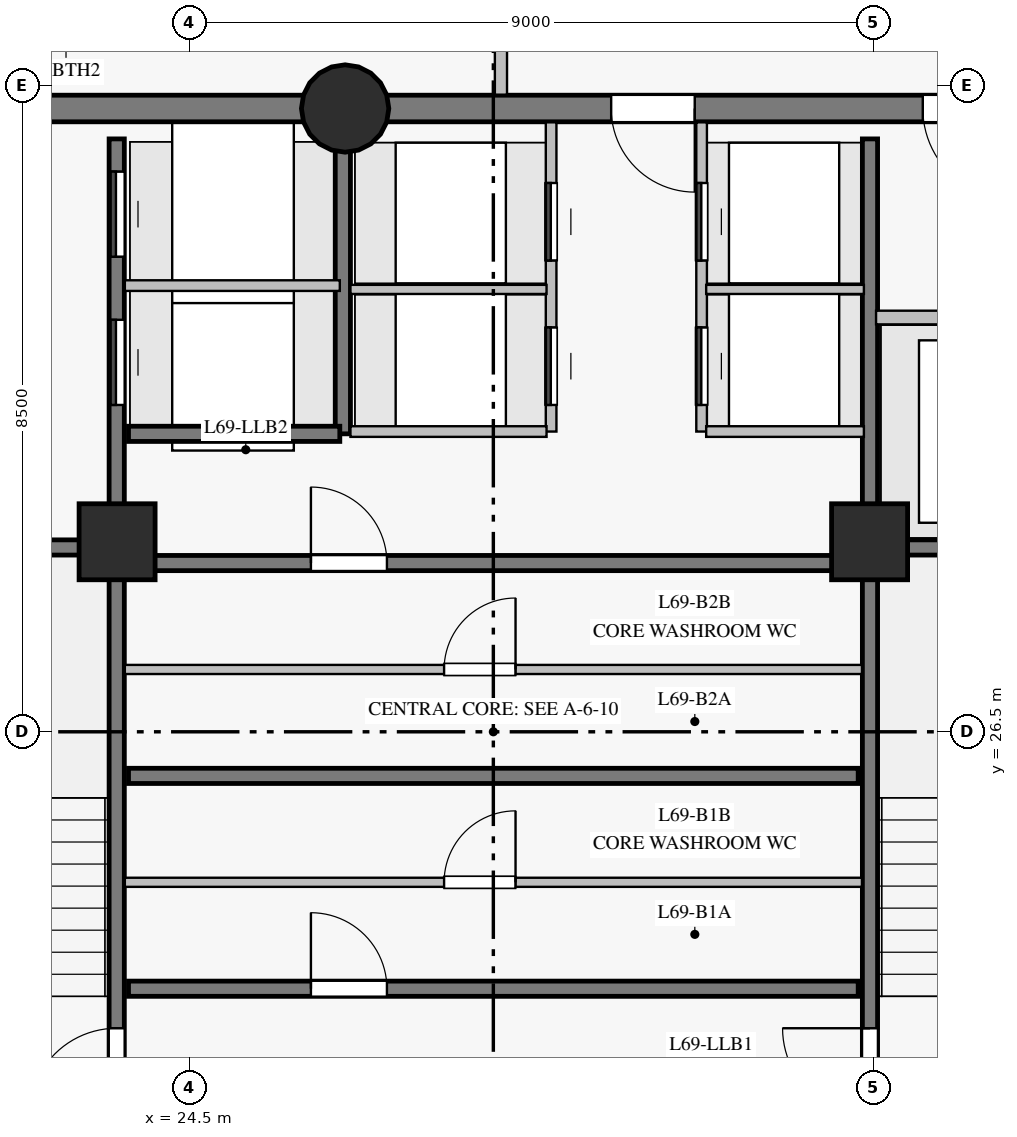
"""IFC4 building model, lengths in metres.
Left out: names, types, materials, properties, quantities, classifications, styles, units other than length and angle.
Written with IfcOpenShell. Run it as: python <this file> out.ifc"""

import sys

from ifc_helpers import new_model, si_unit, direction, frame, frame_2d, origin, origin_with_axes, origin_2d, place, context, subcontext, project, spatial, rectangle, circle, extrude, source, transform, mapped, element, fill, save


model = new_model("IFC4")
c1 = context("Model", 3, precision=1e-05, world=origin(), true_north=direction((0.0, 1.0)))
c2 = subcontext(c1, "Body", "Model", "MODEL_VIEW")
j1 = project(units=[si_unit("LENGTHUNIT", "METRE"), si_unit("PLANEANGLEUNIT", "RADIAN")], contexts=[c1])
p1 = place(None, origin())
s1 = spatial("IfcSite", under=j1, at=p1, CompositionType="ELEMENT")
p2 = place(p1, origin())
s2 = spatial("IfcBuilding", under=s1, at=p2, CompositionType="ELEMENT")
p3 = place(p2, frame((0.0, 0.0, 235.2)))
s3 = spatial("IfcBuildingStorey", under=s2, at=p3, CompositionType="ELEMENT", Elevation=235.2)
p4 = place(p3, frame((37.5, 34.7, 0.0), z_axis=(0.0, 0.0, 1.0), x_axis=(-1.0, 0.0, 0.0)))
e1 = element("IfcWall", 1, at=p4, inside=s3, PredefinedType="SHEAR", context=c2, shape_type="SweptSolid", body=[
    extrude(rectangle(XDim=10.95, YDim=0.35, at=frame_2d((5.475, 0.0))), origin(), (0.0, 0.0, 1.0), 2.85),
])
p5 = place(p4, frame((2.15, 0.0, 0.0)))
e2 = element("IfcOpeningElement", 2, at=p5, cuts=e1, PredefinedType="OPENING", context=c2, shape_type="SweptSolid", body=[
    extrude(rectangle(XDim=1.2, YDim=2.15, at=frame_2d((0.6, 1.075))), frame((0.0, 0.185, 0.0), z_axis=(0.0, -1.0, 0.0), x_axis=(1.0, 0.0, 0.0)), (0.0, 0.0, 1.0), 0.37),
])
p6 = place(p4, frame((6.35, 0.0, 0.0)))
e3 = element("IfcOpeningElement", 3, at=p6, cuts=e1, PredefinedType="OPENING", context=c2, shape_type="SweptSolid", body=[
    extrude(rectangle(XDim=1.1, YDim=2.15, at=frame_2d((0.55, 1.075))), frame((0.0, 0.185, 0.0), z_axis=(0.0, -1.0, 0.0), x_axis=(1.0, 0.0, 0.0)), (0.0, 0.0, 1.0), 0.37),
])
p7 = place(p3, frame((26.55, 34.7, 0.0), z_axis=(0.0, 0.0, 1.0), x_axis=(-1.0, 0.0, 0.0)))
e4 = element("IfcWall", 4, at=p7, inside=s3, PredefinedType="SHEAR", context=c2, shape_type="SweptSolid", body=[
    extrude(rectangle(XDim=7.05, YDim=0.35, at=frame_2d((3.525, 0.0))), origin(), (0.0, 0.0, 1.0), 2.85),
])
m1 = source(origin_with_axes(), c2, "Body", "SweptSolid", [
    extrude(circle(Radius=0.575, at=origin_2d()), origin(), (0.0, 0.0, 1.0), 3.05),
])
p8 = place(p3, frame((26.55, 34.7, 0.0), z_axis=(0.0, 0.0, 1.0), x_axis=(1.0, 0.0, 0.0)))
e5 = element("IfcColumn", 5, at=p8, inside=s3, PredefinedType="COLUMN", context=c2, shape_type="MappedRepresentation", body=[
    mapped(m1, transform((0.0, 0.0, 0.0), scale=1.0)),
])
m2 = source(origin_with_axes(), c2, "Body", "SweptSolid", [
    extrude(rectangle(XDim=1.0, YDim=1.0, at=origin_2d()), origin(), (0.0, 0.0, 1.0), 3.05),
])
for number, where, z_axis, x_axis in (
    (6, (23.55, 29.0, 0.0), (0.0, 0.0, 1.0), (1.0, 0.0, 0.0)),
    (7, (33.45, 29.0, 0.0), (0.0, 0.0, 1.0), (1.0, 0.0, 0.0)),
):
    element("IfcColumn", number, at=place(p3, frame(where, z_axis=z_axis, x_axis=x_axis)), inside=s3, PredefinedType="COLUMN", context=c2, shape_type="MappedRepresentation", body=[
        mapped(m2, transform((0.0, 0.0, 0.0), scale=1.0)),
    ])
p9 = place(p3, frame((23.545, 18.7, 0.0), z_axis=(0.0, 0.0, 1.0), x_axis=(0.0, 1.0, 0.0)))
e8 = element("IfcWall", 8, at=p9, inside=s3, PredefinedType="SHEAR", context=c2, shape_type="SweptSolid", body=[
    extrude(rectangle(XDim=15.6, YDim=0.2, at=frame_2d((7.8, 0.0))), origin(), (0.0, 0.0, 1.0), 2.85),
])
p10 = place(p9, frame((2.75, 0.0, 0.0)))
e9 = element("IfcOpeningElement", 9, at=p10, cuts=e8, PredefinedType="OPENING", context=c2, shape_type="SweptSolid", body=[
    extrude(rectangle(XDim=1.15, YDim=2.15, at=frame_2d((0.575, 1.075))), frame((0.0, 0.11, 0.0), z_axis=(0.0, -1.0, 0.0), x_axis=(1.0, 0.0, 0.0)), (0.0, 0.0, 1.0), 0.22),
])
p11 = place(p9, frame((0.14, 0.0, 0.0)))
e10 = element("IfcOpeningElement", 10, at=p11, cuts=e8, PredefinedType="OPENING", context=c2, shape_type="SweptSolid", body=[
    extrude(rectangle(XDim=0.88, YDim=2.1, at=frame_2d((0.44, 1.05))), frame((0.0, 0.11, 0.0), z_axis=(0.0, -1.0, 0.0), x_axis=(1.0, 0.0, 0.0)), (0.0, 0.0, 1.0), 0.22),
])
p12 = place(p9, frame((1.36, 0.0, 0.0)))
e11 = element("IfcOpeningElement", 11, at=p12, cuts=e8, PredefinedType="OPENING", context=c2, shape_type="SweptSolid", body=[
    extrude(rectangle(XDim=0.88, YDim=2.1, at=frame_2d((0.44, 1.05))), frame((0.0, 0.11, 0.0), z_axis=(0.0, -1.0, 0.0), x_axis=(1.0, 0.0, 0.0)), (0.0, 0.0, 1.0), 0.22),
])
p13 = place(p9, frame((12.1, 0.0, 0.0)))
e12 = element("IfcOpeningElement", 12, at=p13, cuts=e8, PredefinedType="OPENING", context=c2, shape_type="SweptSolid", body=[
    extrude(rectangle(XDim=1.12, YDim=2.15, at=frame_2d((0.56, 1.075))), frame((0.0, 0.11, 0.0), z_axis=(0.0, -1.0, 0.0), x_axis=(1.0, 0.0, 0.0)), (0.0, 0.0, 1.0), 0.22),
])
p14 = place(p9, frame((14.05, 0.0, 0.0)))
e13 = element("IfcOpeningElement", 13, at=p14, cuts=e8, PredefinedType="OPENING", context=c2, shape_type="SweptSolid", body=[
    extrude(rectangle(XDim=1.12, YDim=2.15, at=frame_2d((0.56, 1.075))), frame((0.0, 0.11, 0.0), z_axis=(0.0, -1.0, 0.0), x_axis=(1.0, 0.0, 0.0)), (0.0, 0.0, 1.0), 0.22),
])
p15 = place(p3, frame((33.455, 18.7, 0.0), z_axis=(0.0, 0.0, 1.0), x_axis=(0.0, 1.0, 0.0)))
e14 = element("IfcWall", 14, at=p15, inside=s3, PredefinedType="SHEAR", context=c2, shape_type="SweptSolid", body=[
    extrude(rectangle(XDim=15.6, YDim=0.2, at=frame_2d((7.8, 0.0))), origin(), (0.0, 0.0, 1.0), 2.85),
])
p16 = place(p15, frame((2.75, 0.0, 0.0)))
e15 = element("IfcOpeningElement", 15, at=p16, cuts=e14, PredefinedType="OPENING", context=c2, shape_type="SweptSolid", body=[
    extrude(rectangle(XDim=1.15, YDim=2.15, at=frame_2d((0.575, 1.075))), frame((0.0, 0.11, 0.0), z_axis=(0.0, -1.0, 0.0), x_axis=(1.0, 0.0, 0.0)), (0.0, 0.0, 1.0), 0.22),
])
p17 = place(p15, frame((0.55, 0.0, 0.0)))
e16 = element("IfcOpeningElement", 16, at=p17, cuts=e14, PredefinedType="OPENING", context=c2, shape_type="SweptSolid", body=[
    extrude(rectangle(XDim=0.94, YDim=2.1, at=frame_2d((0.47, 1.05))), frame((0.0, 0.11, 0.0), z_axis=(0.0, -1.0, 0.0), x_axis=(1.0, 0.0, 0.0)), (0.0, 0.0, 1.0), 0.22),
])
p18 = place(p3, frame((23.7, 23.12, 0.0), z_axis=(0.0, 0.0, 1.0), x_axis=(1.0, 0.0, 0.0)))
e17 = element("IfcWall", 17, at=p18, inside=s3, PredefinedType="SHEAR", context=c2, shape_type="SweptSolid", body=[
    extrude(rectangle(XDim=9.6, YDim=0.2, at=frame_2d((4.8, 0.0))), origin(), (0.0, 0.0, 1.0), 2.85),
])
p19 = place(p18, frame((2.4, 0.0, 0.0)))
e18 = element("IfcOpeningElement", 18, at=p19, cuts=e17, PredefinedType="OPENING", context=c2, shape_type="SweptSolid", body=[
    extrude(rectangle(XDim=1.0, YDim=2.15, at=frame_2d((0.5, 1.075))), frame((0.0, 0.11, 0.0), z_axis=(0.0, -1.0, 0.0), x_axis=(1.0, 0.0, 0.0)), (0.0, 0.0, 1.0), 0.22),
])
p20 = place(p3, frame((23.7, 25.92, 0.0), z_axis=(0.0, 0.0, 1.0), x_axis=(1.0, 0.0, 0.0)))
e19 = element("IfcWall", 19, at=p20, inside=s3, PredefinedType="SHEAR", context=c2, shape_type="SweptSolid", body=[
    extrude(rectangle(XDim=9.6, YDim=0.2, at=frame_2d((4.8, 0.0))), origin(), (0.0, 0.0, 1.0), 2.85),
])
p21 = place(p3, frame((23.7, 28.72, 0.0), z_axis=(0.0, 0.0, 1.0), x_axis=(1.0, 0.0, 0.0)))
e20 = element("IfcWall", 20, at=p21, inside=s3, PredefinedType="SHEAR", context=c2, shape_type="SweptSolid", body=[
    extrude(rectangle(XDim=9.6, YDim=0.2, at=frame_2d((4.8, 0.0))), origin(), (0.0, 0.0, 1.0), 2.85),
])
p22 = place(p21, frame((2.4, 0.0, 0.0)))
e21 = element("IfcOpeningElement", 21, at=p22, cuts=e20, PredefinedType="OPENING", context=c2, shape_type="SweptSolid", body=[
    extrude(rectangle(XDim=1.0, YDim=2.15, at=frame_2d((0.5, 1.075))), frame((0.0, 0.11, 0.0), z_axis=(0.0, -1.0, 0.0), x_axis=(1.0, 0.0, 0.0)), (0.0, 0.0, 1.0), 0.22),
])
for number, where, z_axis, x_axis in (
    (22, (33.455, 28.925, 0.0), (0.0, 0.0, 1.0), (1.0, 0.0, 0.0)),
    (23, (19.55, 28.925, 0.0), (0.0, 0.0, 1.0), (1.0, 0.0, 0.0)),
):
    element("IfcWall", number, at=place(p3, frame(where, z_axis=z_axis, x_axis=x_axis)), inside=s3, PredefinedType="SHEAR", context=c2, shape_type="SweptSolid", body=[
        extrude(rectangle(XDim=3.995, YDim=0.2, at=frame_2d((1.998, 0.0))), origin(), (0.0, 0.0, 1.0), 2.85),
    ])
p23 = place(p3, frame((26.52, 30.42, 0.0), z_axis=(0.0, 0.0, 1.0), x_axis=(0.0, 1.0, 0.0)))
e24 = element("IfcWall", 24, at=p23, inside=s3, PredefinedType="SHEAR", context=c2, shape_type="SweptSolid", body=[
    extrude(rectangle(XDim=3.86, YDim=0.2, at=frame_2d((1.93, 0.0))), origin(), (0.0, 0.0, 1.0), 2.85),
])
p24 = place(p3, frame((23.7, 30.42, 0.0), z_axis=(0.0, 0.0, 1.0), x_axis=(1.0, 0.0, 0.0)))
e25 = element("IfcWall", 25, at=p24, inside=s3, PredefinedType="SHEAR", context=c2, shape_type="SweptSolid", body=[
    extrude(rectangle(XDim=2.78, YDim=0.2, at=frame_2d((1.39, 0.0))), origin(), (0.0, 0.0, 1.0), 2.85),
])
p25 = place(p3, frame((23.652, 24.52, 0.0), z_axis=(0.0, 0.0, 1.0), x_axis=(1.0, 0.0, 0.0)))
e26 = element("IfcWall", 26, at=p25, inside=s3, PredefinedType="PARTITIONING", context=c2, shape_type="SweptSolid", body=[
    extrude(rectangle(XDim=9.698, YDim=0.12, at=frame_2d((4.849, 0.0))), origin(), (0.0, 0.0, 1.0), 2.85),
])
p26 = place(p25, frame((4.2, 0.0, 0.0)))
e27 = element("IfcOpeningElement", 27, at=p26, cuts=e26, PredefinedType="OPENING", context=c2, shape_type="SweptSolid", body=[
    extrude(rectangle(XDim=0.94, YDim=2.1, at=frame_2d((0.47, 1.05))), frame((0.0, 0.07, 0.0), z_axis=(0.0, -1.0, 0.0), x_axis=(1.0, 0.0, 0.0)), (0.0, 0.0, 1.0), 0.14),
])
p27 = place(p3, frame((23.652, 27.32, 0.0), z_axis=(0.0, 0.0, 1.0), x_axis=(1.0, 0.0, 0.0)))
e28 = element("IfcWall", 28, at=p27, inside=s3, PredefinedType="PARTITIONING", context=c2, shape_type="SweptSolid", body=[
    extrude(rectangle(XDim=9.698, YDim=0.12, at=frame_2d((4.849, 0.0))), origin(), (0.0, 0.0, 1.0), 2.85),
])
p28 = place(p27, frame((4.2, 0.0, 0.0)))
e29 = element("IfcOpeningElement", 29, at=p28, cuts=e28, PredefinedType="OPENING", context=c2, shape_type="SweptSolid", body=[
    extrude(rectangle(XDim=0.94, YDim=2.1, at=frame_2d((0.47, 1.05))), frame((0.0, 0.07, 0.0), z_axis=(0.0, -1.0, 0.0), x_axis=(1.0, 0.0, 0.0)), (0.0, 0.0, 1.0), 0.14),
])
p29 = place(p3, frame((29.26, 30.45, 0.0), z_axis=(0.0, 0.0, 1.0), x_axis=(0.0, 1.0, 0.0)))
e30 = element("IfcWall", 30, at=p29, inside=s3, PredefinedType="PARTITIONING", context=c2, shape_type="SweptSolid", body=[
    extrude(rectangle(XDim=4.068, YDim=0.14, at=frame_2d((2.034, 0.0))), origin(), (0.0, 0.0, 1.0), 2.85),
])
p30 = place(p29, frame((0.35, 0.0, 0.0)))
e31 = element("IfcOpeningElement", 31, at=p30, cuts=e30, PredefinedType="OPENING", context=c2, shape_type="SweptSolid", body=[
    extrude(rectangle(XDim=1.02, YDim=2.15, at=frame_2d((0.51, 1.075))), frame((0.0, 0.08, 0.0), z_axis=(0.0, -1.0, 0.0), x_axis=(1.0, 0.0, 0.0)), (0.0, 0.0, 1.0), 0.16),
])
p31 = place(p29, frame((2.25, 0.0, 0.0)))
e32 = element("IfcOpeningElement", 32, at=p31, cuts=e30, PredefinedType="OPENING", context=c2, shape_type="SweptSolid", body=[
    extrude(rectangle(XDim=1.02, YDim=2.15, at=frame_2d((0.51, 1.075))), frame((0.0, 0.08, 0.0), z_axis=(0.0, -1.0, 0.0), x_axis=(1.0, 0.0, 0.0)), (0.0, 0.0, 1.0), 0.16),
])
p32 = place(p3, frame((31.24, 30.45, 0.0), z_axis=(0.0, 0.0, 1.0), x_axis=(0.0, 1.0, 0.0)))
e33 = element("IfcWall", 33, at=p32, inside=s3, PredefinedType="PARTITIONING", context=c2, shape_type="SweptSolid", body=[
    extrude(rectangle(XDim=4.068, YDim=0.14, at=frame_2d((2.034, 0.0))), origin(), (0.0, 0.0, 1.0), 2.85),
])
p33 = place(p32, frame((0.35, 0.0, 0.0)))
e34 = element("IfcOpeningElement", 34, at=p33, cuts=e33, PredefinedType="OPENING", context=c2, shape_type="SweptSolid", body=[
    extrude(rectangle(XDim=1.02, YDim=2.15, at=frame_2d((0.51, 1.075))), frame((0.0, 0.08, 0.0), z_axis=(0.0, -1.0, 0.0), x_axis=(1.0, 0.0, 0.0)), (0.0, 0.0, 1.0), 0.16),
])
p34 = place(p32, frame((2.25, 0.0, 0.0)))
e35 = element("IfcOpeningElement", 35, at=p34, cuts=e33, PredefinedType="OPENING", context=c2, shape_type="SweptSolid", body=[
    extrude(rectangle(XDim=1.02, YDim=2.15, at=frame_2d((0.51, 1.075))), frame((0.0, 0.08, 0.0), z_axis=(0.0, -1.0, 0.0), x_axis=(1.0, 0.0, 0.0)), (0.0, 0.0, 1.0), 0.16),
])
p35 = place(p3, frame((33.535, 31.95, 0.0), z_axis=(0.0, 0.0, 1.0), x_axis=(1.0, 0.0, 0.0)))
e36 = element("IfcWall", 36, at=p35, inside=s3, PredefinedType="PARTITIONING", context=c2, shape_type="SweptSolid", body=[
    extrude(rectangle(XDim=3.784, YDim=0.18, at=frame_2d((1.892, 0.0))), origin(), (0.0, 0.0, 1.0), 2.85),
])
p36 = place(p35, frame((0.9, 0.0, 0.0)))
e37 = element("IfcOpeningElement", 37, at=p36, cuts=e36, PredefinedType="OPENING", context=c2, shape_type="SweptSolid", body=[
    extrude(rectangle(XDim=1.3, YDim=2.2, at=frame_2d((0.65, 1.1))), frame((0.0, 0.1, 0.0), z_axis=(0.0, -1.0, 0.0), x_axis=(1.0, 0.0, 0.0)), (0.0, 0.0, 1.0), 0.2),
])
p37 = place(p3, frame((23.652, 32.37, 0.0), z_axis=(0.0, 0.0, 1.0), x_axis=(1.0, 0.0, 0.0)))
e38 = element("IfcWall", 38, at=p37, inside=s3, PredefinedType="PARTITIONING", context=c2, shape_type="SweptSolid", body=[
    extrude(rectangle(XDim=2.828, YDim=0.14, at=frame_2d((1.414, 0.0))), origin(), (0.0, 0.0, 1.0), 2.85),
])
p38 = place(p3, frame((26.62, 30.45, 0.0), z_axis=(0.0, 0.0, 1.0), x_axis=(1.0, 0.0, 0.0)))
e39 = element("IfcWall", 39, at=p38, inside=s3, PredefinedType="PARTITIONING", context=c2, shape_type="SweptSolid", body=[
    extrude(rectangle(XDim=2.58, YDim=0.14, at=frame_2d((1.29, 0.0))), origin(), (0.0, 0.0, 1.0), 2.85),
])
p39 = place(p3, frame((26.62, 32.32, 0.0), z_axis=(0.0, 0.0, 1.0), x_axis=(1.0, 0.0, 0.0)))
e40 = element("IfcWall", 40, at=p39, inside=s3, PredefinedType="PARTITIONING", context=c2, shape_type="SweptSolid", body=[
    extrude(rectangle(XDim=2.58, YDim=0.12, at=frame_2d((1.29, 0.0))), origin(), (0.0, 0.0, 1.0), 2.85),
])
p40 = place(p3, frame((31.3, 30.45, 0.0), z_axis=(0.0, 0.0, 1.0), x_axis=(1.0, 0.0, 0.0)))
e41 = element("IfcWall", 41, at=p40, inside=s3, PredefinedType="PARTITIONING", context=c2, shape_type="SweptSolid", body=[
    extrude(rectangle(XDim=2.075, YDim=0.14, at=frame_2d((1.038, 0.0))), origin(), (0.0, 0.0, 1.0), 2.85),
])
p41 = place(p3, frame((31.3, 32.32, 0.0), z_axis=(0.0, 0.0, 1.0), x_axis=(1.0, 0.0, 0.0)))
e42 = element("IfcWall", 42, at=p41, inside=s3, PredefinedType="PARTITIONING", context=c2, shape_type="SweptSolid", body=[
    extrude(rectangle(XDim=2.075, YDim=0.12, at=frame_2d((1.038, 0.0))), origin(), (0.0, 0.0, 1.0), 2.85),
])
p42 = place(p3, frame((28.6, 34.882, 0.0), z_axis=(0.0, 0.0, 1.0), x_axis=(0.0, 1.0, 0.0)))
e43 = element("IfcWall", 43, at=p42, inside=s3, PredefinedType="PARTITIONING", context=c2, shape_type="SweptSolid", body=[
    extrude(rectangle(XDim=1.518, YDim=0.16, at=frame_2d((0.759, 0.0))), origin(), (0.0, 0.0, 1.0), 2.85),
])
m3 = source(origin_with_axes(), c2, "Body", "SweptSolid", [
    extrude(rectangle(XDim=1.15, YDim=2.15, at=frame_2d((0.575, 1.075))), frame((0.0, 0.025, 0.0), z_axis=(0.0, -1.0, 0.0), x_axis=(1.0, 0.0, 0.0)), (0.0, 0.0, 1.0), 0.05),
])
p43 = place(p10, origin())
e44 = element("IfcDoor", 44, at=p43, inside=s3, OperationType="SINGLE_SWING_LEFT", PredefinedType="DOOR", context=c2, shape_type="MappedRepresentation", body=[
    mapped(m3, transform((0.0, 0.0, 0.0), scale=1.0)),
])
fill(e9, e44)
p44 = place(p16, origin())
e45 = element("IfcDoor", 45, at=p44, inside=s3, OperationType="SINGLE_SWING_RIGHT", PredefinedType="DOOR", context=c2, shape_type="MappedRepresentation", body=[
    mapped(m3, transform((0.0, 0.0, 0.0), scale=1.0)),
])
fill(e15, e45)
m4 = source(origin_with_axes(), c2, "Body", "SweptSolid", [
    extrude(rectangle(XDim=1.2, YDim=2.15, at=frame_2d((0.6, 1.075))), frame((0.0, 0.025, 0.0), z_axis=(0.0, -1.0, 0.0), x_axis=(1.0, 0.0, 0.0)), (0.0, 0.0, 1.0), 0.05),
])
p45 = place(p5, origin())
e46 = element("IfcDoor", 46, at=p45, inside=s3, OperationType="SINGLE_SWING_LEFT", PredefinedType="DOOR", context=c2, shape_type="MappedRepresentation", body=[
    mapped(m4, transform((0.0, 0.0, 0.0), scale=1.0)),
])
fill(e2, e46)
m5 = source(origin_with_axes(), c2, "Body", "SweptSolid", [
    extrude(rectangle(XDim=1.0, YDim=2.15, at=frame_2d((0.5, 1.075))), frame((0.0, 0.025, 0.0), z_axis=(0.0, -1.0, 0.0), x_axis=(1.0, 0.0, 0.0)), (0.0, 0.0, 1.0), 0.05),
])
p46 = place(p19, origin())
e47 = element("IfcDoor", 47, at=p46, inside=s3, OperationType="SINGLE_SWING_LEFT", PredefinedType="DOOR", context=c2, shape_type="MappedRepresentation", body=[
    mapped(m5, transform((0.0, 0.0, 0.0), scale=1.0)),
])
fill(e18, e47)
m6 = source(origin_with_axes(), c2, "Body", "SweptSolid", [
    extrude(rectangle(XDim=0.94, YDim=2.1, at=frame_2d((0.47, 1.05))), frame((0.0, 0.025, 0.0), z_axis=(0.0, -1.0, 0.0), x_axis=(1.0, 0.0, 0.0)), (0.0, 0.0, 1.0), 0.05),
])
p47 = place(p26, origin())
e48 = element("IfcDoor", 48, at=p47, inside=s3, OperationType="SINGLE_SWING_RIGHT", PredefinedType="DOOR", context=c2, shape_type="MappedRepresentation", body=[
    mapped(m6, transform((0.0, 0.0, 0.0), scale=1.0)),
])
fill(e27, e48)
p48 = place(p22, origin())
e49 = element("IfcDoor", 49, at=p48, inside=s3, OperationType="SINGLE_SWING_LEFT", PredefinedType="DOOR", context=c2, shape_type="MappedRepresentation", body=[
    mapped(m5, transform((0.0, 0.0, 0.0), scale=1.0)),
])
fill(e21, e49)
p49 = place(p28, origin())
e50 = element("IfcDoor", 50, at=p49, inside=s3, OperationType="SINGLE_SWING_RIGHT", PredefinedType="DOOR", context=c2, shape_type="MappedRepresentation", body=[
    mapped(m6, transform((0.0, 0.0, 0.0), scale=1.0)),
])
fill(e29, e50)
m7 = source(origin_with_axes(), c2, "Body", "SweptSolid", [
    extrude(rectangle(XDim=1.1, YDim=2.15, at=frame_2d((0.55, 1.075))), frame((0.0, 0.025, 0.0), z_axis=(0.0, -1.0, 0.0), x_axis=(1.0, 0.0, 0.0)), (0.0, 0.0, 1.0), 0.05),
])
p50 = place(p6, origin())
e51 = element("IfcDoor", 51, at=p50, inside=s3, OperationType="SINGLE_SWING_LEFT", PredefinedType="DOOR", context=c2, shape_type="MappedRepresentation", body=[
    mapped(m7, transform((0.0, 0.0, 0.0), scale=1.0)),
])
fill(e3, e51)
m8 = source(origin_with_axes(), c2, "Body", "SweptSolid", [
    extrude(rectangle(XDim=1.12, YDim=2.15, at=frame_2d((0.56, 1.075))), frame((0.0, 0.025, 0.0), z_axis=(0.0, -1.0, 0.0), x_axis=(1.0, 0.0, 0.0)), (0.0, 0.0, 1.0), 0.05),
])
p51 = place(p13, origin())
e52 = element("IfcDoor", 52, at=p51, inside=s3, OperationType="SLIDING_TO_LEFT", PredefinedType="DOOR", context=c2, shape_type="MappedRepresentation", body=[
    mapped(m8, transform((0.0, 0.0, 0.0), scale=1.0)),
])
fill(e12, e52)
p52 = place(p14, origin())
e53 = element("IfcDoor", 53, at=p52, inside=s3, OperationType="SLIDING_TO_RIGHT", PredefinedType="DOOR", context=c2, shape_type="MappedRepresentation", body=[
    mapped(m8, transform((0.0, 0.0, 0.0), scale=1.0)),
])
fill(e13, e53)
m9 = source(origin_with_axes(), c2, "Body", "SweptSolid", [
    extrude(rectangle(XDim=1.02, YDim=2.15, at=frame_2d((0.51, 1.075))), frame((0.0, 0.025, 0.0), z_axis=(0.0, -1.0, 0.0), x_axis=(1.0, 0.0, 0.0)), (0.0, 0.0, 1.0), 0.05),
])
p53 = place(p30, origin())
e54 = element("IfcDoor", 54, at=p53, inside=s3, OperationType="SLIDING_TO_LEFT", PredefinedType="DOOR", context=c2, shape_type="MappedRepresentation", body=[
    mapped(m9, transform((0.0, 0.0, 0.0), scale=1.0)),
])
fill(e31, e54)
p54 = place(p31, origin())
e55 = element("IfcDoor", 55, at=p54, inside=s3, OperationType="SLIDING_TO_LEFT", PredefinedType="DOOR", context=c2, shape_type="MappedRepresentation", body=[
    mapped(m9, transform((0.0, 0.0, 0.0), scale=1.0)),
])
fill(e32, e55)
p55 = place(p33, origin())
e56 = element("IfcDoor", 56, at=p55, inside=s3, OperationType="SLIDING_TO_LEFT", PredefinedType="DOOR", context=c2, shape_type="MappedRepresentation", body=[
    mapped(m9, transform((0.0, 0.0, 0.0), scale=1.0)),
])
fill(e34, e56)
p56 = place(p34, origin())
e57 = element("IfcDoor", 57, at=p56, inside=s3, OperationType="SLIDING_TO_LEFT", PredefinedType="DOOR", context=c2, shape_type="MappedRepresentation", body=[
    mapped(m9, transform((0.0, 0.0, 0.0), scale=1.0)),
])
fill(e35, e57)
save(model, sys.argv[1])
